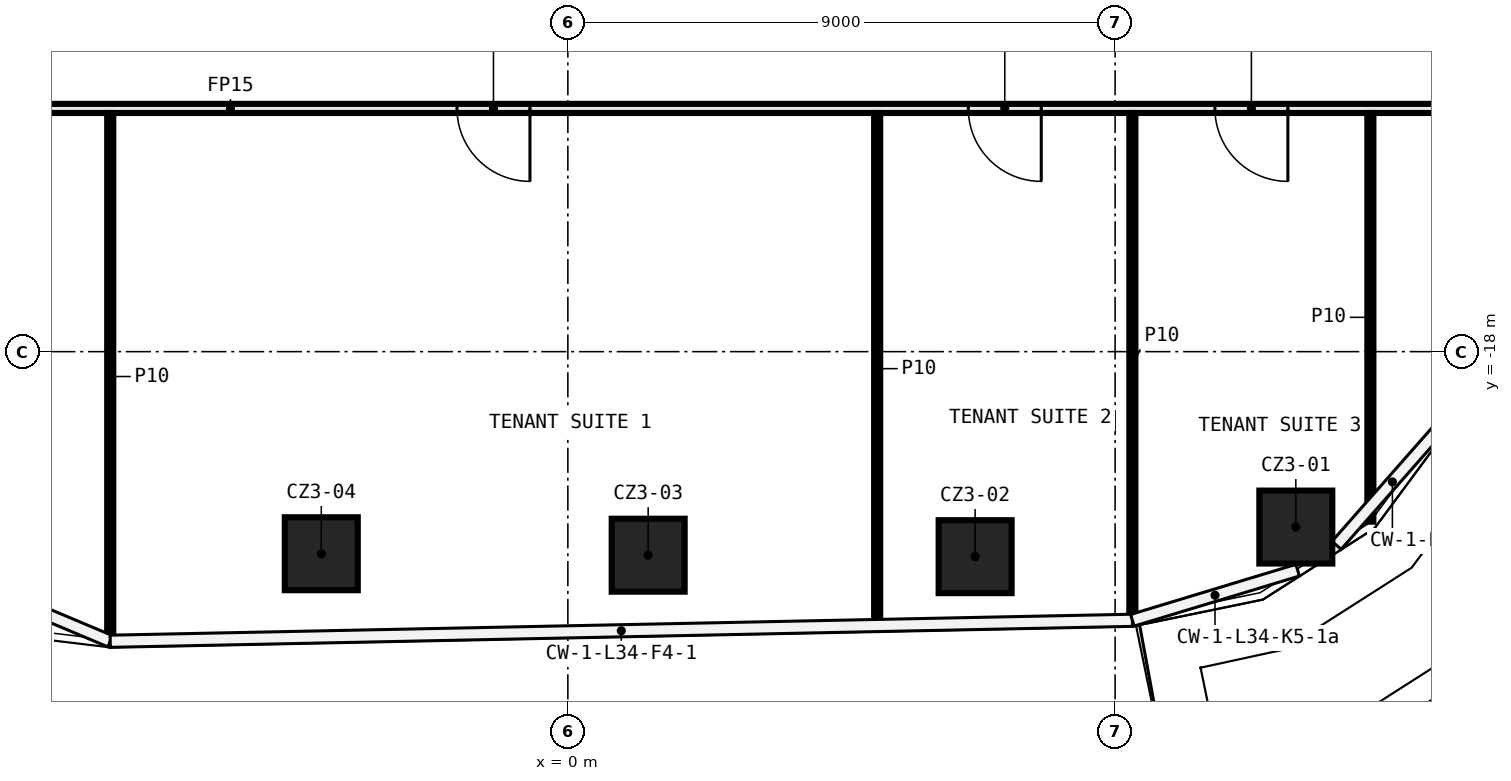
"""IFC4 building model, lengths in metres.
Left out: names, types, materials, properties, quantities, classifications, styles, units other than length and angle.
Written with IfcOpenShell. Run it as: python <this file> out.ifc"""

import sys

from ifc_helpers import new_model, si_unit, direction, frame, frame_2d, origin, origin_2d, place, context, subcontext, project, spatial, rectangle, extrude, element, fill, save


model = new_model("IFC4")
c1 = context("Model", 3, precision=1e-05, world=origin(), true_north=direction((0.0, 1.0)))
c2 = subcontext(c1, "Body", "Model", "MODEL_VIEW")
j1 = project(units=[si_unit("LENGTHUNIT", "METRE"), si_unit("PLANEANGLEUNIT", "RADIAN")], contexts=[c1])
p1 = place(None, origin())
s1 = spatial("IfcSite", under=j1, at=p1, CompositionType="ELEMENT")
p2 = place(p1, origin())
s2 = spatial("IfcBuilding", under=s1, at=p2, CompositionType="ELEMENT")
p3 = place(p2, frame((0.0, 0.0, 158.6)))
s3 = spatial("IfcBuildingStorey", under=s2, at=p3, CompositionType="ELEMENT", Elevation=158.6)
for number, where, z_axis, x_axis in (
    (1, (11.972, -20.885, 0.0), (0.0, 0.0, 1.0), (1.0, 0.0, 0.0)),
    (2, (6.698, -21.372, 0.0), (0.0, 0.0, 1.0), (1.0, 0.0, 0.0)),
    (3, (1.321, -21.348, 0.0), (0.0, 0.0, 1.0), (1.0, 0.0, 0.0)),
    (4, (-4.055, -21.324, 0.0), (0.0, 0.0, 1.0), (1.0, 0.0, 0.0)),
):
    element("IfcColumn", number, at=place(p3, frame(where, z_axis=z_axis, x_axis=x_axis)), inside=s3, PredefinedType="COLUMN", context=c2, shape_type="SweptSolid", body=[
        extrude(rectangle(XDim=1.2, YDim=1.2, at=origin_2d()), origin(), (0.0, 0.0, 1.0), 3.82),
    ])
p4 = place(p3, frame((15.165, -14.0, 0.0), z_axis=(0.0, 0.0, 1.0), x_axis=(-1.0, 0.0, 0.0)))
e5 = element("IfcWall", 5, at=p4, inside=s3, PredefinedType="PARTITIONING", context=c2, shape_type="SweptSolid", body=[
    extrude(rectangle(XDim=24.24, YDim=0.15, at=frame_2d((12.12, 0.0))), origin(), (0.0, 0.0, 1.0), 3.82),
])
p5 = place(p4, frame((15.788, 0.0, 0.0)))
e6 = element("IfcOpeningElement", 6, at=p5, cuts=e5, PredefinedType="OPENING", context=c2, shape_type="SweptSolid", body=[
    extrude(rectangle(XDim=1.2, YDim=2.1, at=frame_2d((0.6, 1.05))), frame((0.0, 0.085, 0.0), z_axis=(0.0, -1.0, 0.0), x_axis=(1.0, 0.0, 0.0)), (0.0, 0.0, 1.0), 0.17),
])
p6 = place(p4, frame((7.379, 0.0, 0.0)))
e7 = element("IfcOpeningElement", 7, at=p6, cuts=e5, PredefinedType="OPENING", context=c2, shape_type="SweptSolid", body=[
    extrude(rectangle(XDim=1.2, YDim=2.1, at=frame_2d((0.6, 1.05))), frame((0.0, 0.085, 0.0), z_axis=(0.0, -1.0, 0.0), x_axis=(1.0, 0.0, 0.0)), (0.0, 0.0, 1.0), 0.17),
])
p7 = place(p4, frame((3.323, 0.0, 0.0)))
e8 = element("IfcOpeningElement", 8, at=p7, cuts=e5, PredefinedType="OPENING", context=c2, shape_type="SweptSolid", body=[
    extrude(rectangle(XDim=1.2, YDim=2.1, at=frame_2d((0.6, 1.05))), frame((0.0, 0.085, 0.0), z_axis=(0.0, -1.0, 0.0), x_axis=(1.0, 0.0, 0.0)), (0.0, 0.0, 1.0), 0.17),
])
p8 = place(p3, frame((13.198, -20.796, 0.0), z_axis=(0.0, 0.0, 1.0), x_axis=(0.0, 1.0, 0.0)))
e9 = element("IfcWall", 9, at=p8, inside=s3, PredefinedType="PARTITIONING", context=c2, shape_type="SweptSolid", body=[
    extrude(rectangle(XDim=6.721, YDim=0.1, at=frame_2d((3.361, 0.0))), origin(), (0.0, 0.0, 1.0), 3.82),
])
p9 = place(p3, frame((9.284, -22.398, 0.0), z_axis=(0.0, 0.0, 1.0), x_axis=(0.0, 1.0, 0.0)))
e10 = element("IfcWall", 10, at=p9, inside=s3, PredefinedType="PARTITIONING", context=c2, shape_type="SweptSolid", body=[
    extrude(rectangle(XDim=8.323, YDim=0.1, at=frame_2d((4.162, 0.0))), origin(), (0.0, 0.0, 1.0), 3.82),
])
p10 = place(p3, frame((5.087, -22.485, 0.0), z_axis=(0.0, 0.0, 1.0), x_axis=(0.0, 1.0, 0.0)))
e11 = element("IfcWall", 11, at=p10, inside=s3, PredefinedType="PARTITIONING", context=c2, shape_type="SweptSolid", body=[
    extrude(rectangle(XDim=8.41, YDim=0.1, at=frame_2d((4.205, 0.0))), origin(), (0.0, 0.0, 1.0), 3.82),
])
p11 = place(p3, frame((-7.526, -22.743, 0.0), z_axis=(0.0, 0.0, 1.0), x_axis=(0.0, 1.0, 0.0)))
e12 = element("IfcWall", 12, at=p11, inside=s3, PredefinedType="PARTITIONING", context=c2, shape_type="SweptSolid", body=[
    extrude(rectangle(XDim=8.668, YDim=0.1, at=frame_2d((4.334, 0.0))), origin(), (0.0, 0.0, 1.0), 3.82),
])
p12 = place(p5, origin())
e13 = element("IfcDoor", 13, at=p12, inside=s3, OperationType="SINGLE_SWING_RIGHT", PredefinedType="DOOR", context=c2, shape_type="SweptSolid", body=[
    extrude(rectangle(XDim=1.2, YDim=2.1, at=frame_2d((0.6, 1.05))), frame((0.0, 0.025, 0.0), z_axis=(0.0, -1.0, 0.0), x_axis=(1.0, 0.0, 0.0)), (0.0, 0.0, 1.0), 0.05),
])
fill(e6, e13)
p13 = place(p6, origin())
e14 = element("IfcDoor", 14, at=p13, inside=s3, OperationType="SINGLE_SWING_LEFT", PredefinedType="DOOR", context=c2, shape_type="SweptSolid", body=[
    extrude(rectangle(XDim=1.2, YDim=2.1, at=frame_2d((0.6, 1.05))), frame((0.0, 0.025, 0.0), z_axis=(0.0, -1.0, 0.0), x_axis=(1.0, 0.0, 0.0)), (0.0, 0.0, 1.0), 0.05),
])
fill(e7, e14)
p14 = place(p7, origin())
e15 = element("IfcDoor", 15, at=p14, inside=s3, OperationType="SINGLE_SWING_RIGHT", PredefinedType="DOOR", context=c2, shape_type="SweptSolid", body=[
    extrude(rectangle(XDim=1.2, YDim=2.1, at=frame_2d((0.6, 1.05))), frame((0.0, 0.025, 0.0), z_axis=(0.0, -1.0, 0.0), x_axis=(1.0, 0.0, 0.0)), (0.0, 0.0, 1.0), 0.05),
])
fill(e8, e15)
save(model, sys.argv[1])
